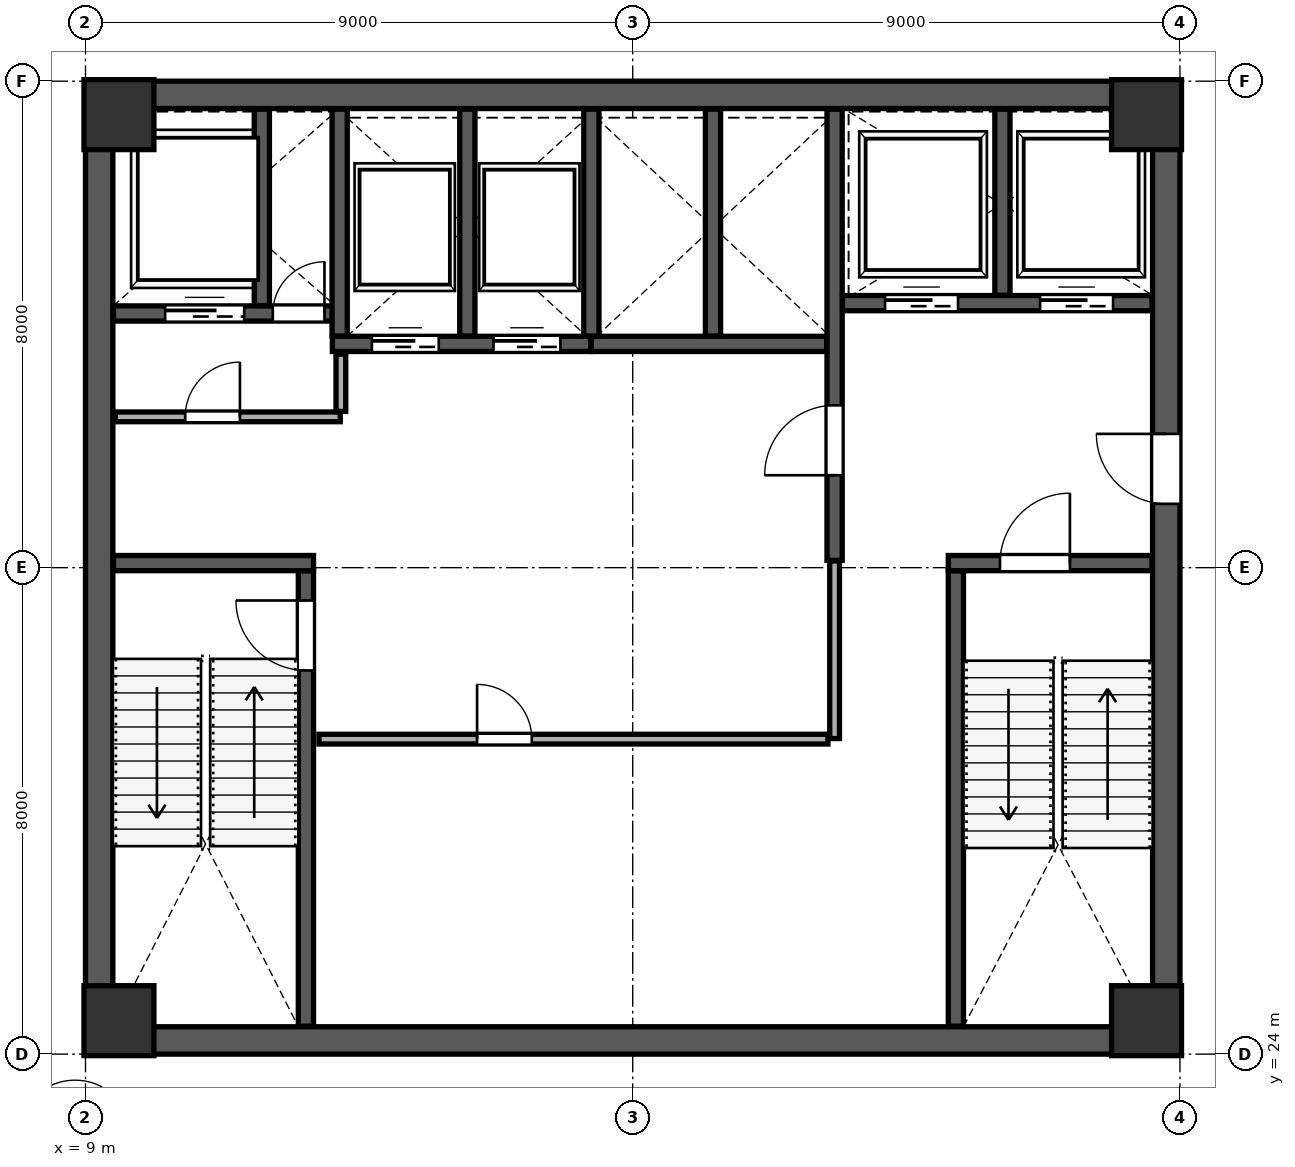
"""IFC4 building model, lengths in metres.
Left out: names, types, materials, properties, quantities, classifications, styles, units other than length and angle.
Written with IfcOpenShell. Run it as: python <this file> out.ifc"""

import sys

from ifc_helpers import new_model, si_unit, direction, frame, frame_2d, origin, origin_2d, place, context, subcontext, project, spatial, rectangle, extrude, source, transform, mapped, element, fill, save


model = new_model("IFC4")
c1 = context("Model", 3, precision=1e-05, world=origin(), true_north=direction((0.0, 1.0)))
c2 = subcontext(c1, "Body", "Model", "MODEL_VIEW")
j1 = project(units=[si_unit("LENGTHUNIT", "METRE"), si_unit("PLANEANGLEUNIT", "RADIAN")], contexts=[c1])
p1 = place(None, origin())
s1 = spatial("IfcSite", under=j1, at=p1, CompositionType="ELEMENT")
p2 = place(p1, origin())
s2 = spatial("IfcBuilding", under=s1, at=p2, CompositionType="ELEMENT")
p3 = place(p2, frame((0.0, 0.0, 175.0)))
s3 = spatial("IfcBuildingStorey", under=s2, at=p3, CompositionType="ELEMENT", Elevation=175.0)
m1 = source(origin(), c2, "Body", "SweptSolid", [
    extrude(rectangle(XDim=1.15, YDim=1.15, at=origin_2d()), origin(), (0.0, 0.0, 1.0), 4.198),
])
for number, where, z_axis, x_axis in (
    (1, (9.55, 24.55, 0.001), (0.0, 0.0, 1.0), (1.0, 0.0, 0.0)),
    (2, (26.45, 24.55, 0.001), (0.0, 0.0, 1.0), (1.0, 0.0, 0.0)),
    (3, (9.55, 39.45, 0.001), (0.0, 0.0, 1.0), (1.0, 0.0, 0.0)),
    (4, (26.45, 39.45, 0.001), (0.0, 0.0, 1.0), (1.0, 0.0, 0.0)),
):
    element("IfcColumn", number, at=place(p3, frame(where, z_axis=z_axis, x_axis=x_axis)), inside=s3, PredefinedType="COLUMN", context=c2, shape_type="MappedRepresentation", body=[
        mapped(m1, transform((0.0, 0.0, 0.0), scale=1.0)),
    ])
p4 = place(p3, frame((9.225, 24.45, 0.0), z_axis=(0.0, 0.0, 1.0), x_axis=(0.0, 1.0, 0.0)))
e5 = element("IfcWall", 5, at=p4, inside=s3, PredefinedType="SHEAR", context=c2, shape_type="SweptSolid", body=[
    extrude(rectangle(XDim=15.1, YDim=0.45, at=frame_2d((7.55, 0.0))), origin(), (0.0, 0.0, 1.0), 3.96),
])
p5 = place(p3, frame((26.775, 24.45, 0.0), z_axis=(0.0, 0.0, 1.0), x_axis=(0.0, 1.0, 0.0)))
e6 = element("IfcWall", 6, at=p5, inside=s3, PredefinedType="SHEAR", context=c2, shape_type="SweptSolid", body=[
    extrude(rectangle(XDim=15.1, YDim=0.45, at=frame_2d((7.55, 0.0))), origin(), (0.0, 0.0, 1.0), 3.96),
])
p6 = place(p5, frame((8.6, 0.0, 0.0)))
e7 = element("IfcOpeningElement", 7, at=p6, cuts=e6, PredefinedType="OPENING", context=c2, shape_type="SweptSolid", body=[
    extrude(rectangle(XDim=1.15, YDim=2.2, at=frame_2d((0.575, 1.1))), frame((0.0, 0.235, 0.0), z_axis=(0.0, -1.0, 0.0), x_axis=(1.0, 0.0, 0.0)), (0.0, 0.0, 1.0), 0.47),
])
for number, where, z_axis, x_axis in (
    (8, (9.0, 24.225, 0.0), (0.0, 0.0, 1.0), (1.0, 0.0, 0.0)),
    (9, (9.0, 39.775, 0.0), (0.0, 0.0, 1.0), (1.0, 0.0, 0.0)),
):
    element("IfcWall", number, at=place(p3, frame(where, z_axis=z_axis, x_axis=x_axis)), inside=s3, PredefinedType="SHEAR", context=c2, shape_type="SweptSolid", body=[
        extrude(rectangle(XDim=18.0, YDim=0.45, at=frame_2d((9.0, 0.0))), origin(), (0.0, 0.0, 1.0), 3.96),
    ])
p7 = place(p3, frame((12.625, 24.46, 0.0), z_axis=(0.0, 0.0, 1.0), x_axis=(0.0, 1.0, 0.0)))
e10 = element("IfcWall", 10, at=p7, inside=s3, PredefinedType="SHEAR", context=c2, shape_type="SweptSolid", body=[
    extrude(rectangle(XDim=7.49, YDim=0.25, at=frame_2d((3.745, 0.0))), origin(), (0.0, 0.0, 1.0), 3.96),
])
p8 = place(p7, frame((5.85, 0.0, 0.0)))
e11 = element("IfcOpeningElement", 11, at=p8, cuts=e10, PredefinedType="OPENING", context=c2, shape_type="SweptSolid", body=[
    extrude(rectangle(XDim=1.15, YDim=2.2, at=frame_2d((0.575, 1.1))), frame((0.0, 0.135, 0.0), z_axis=(0.0, -1.0, 0.0), x_axis=(1.0, 0.0, 0.0)), (0.0, 0.0, 1.0), 0.27),
])
p9 = place(p3, frame((9.46, 32.075, 0.0), z_axis=(0.0, 0.0, 1.0), x_axis=(1.0, 0.0, 0.0)))
e12 = element("IfcWall", 12, at=p9, inside=s3, PredefinedType="SHEAR", context=c2, shape_type="SweptSolid", body=[
    extrude(rectangle(XDim=3.29, YDim=0.25, at=frame_2d((1.645, 0.0))), origin(), (0.0, 0.0, 1.0), 3.96),
])
p10 = place(p3, frame((23.315, 24.46, 0.0), z_axis=(0.0, 0.0, 1.0), x_axis=(0.0, 1.0, 0.0)))
e13 = element("IfcWall", 13, at=p10, inside=s3, PredefinedType="SHEAR", context=c2, shape_type="SweptSolid", body=[
    extrude(rectangle(XDim=7.49, YDim=0.25, at=frame_2d((3.745, 0.0))), origin(), (0.0, 0.0, 1.0), 3.96),
])
p11 = place(p3, frame((23.19, 32.075, 0.0), z_axis=(0.0, 0.0, 1.0), x_axis=(1.0, 0.0, 0.0)))
e14 = element("IfcWall", 14, at=p11, inside=s3, PredefinedType="SHEAR", context=c2, shape_type="SweptSolid", body=[
    extrude(rectangle(XDim=3.35, YDim=0.25, at=frame_2d((1.675, 0.0))), origin(), (0.0, 0.0, 1.0), 3.96),
])
p12 = place(p11, frame((0.85, 0.0, 0.0)))
e15 = element("IfcOpeningElement", 15, at=p12, cuts=e14, PredefinedType="OPENING", context=c2, shape_type="SweptSolid", body=[
    extrude(rectangle(XDim=1.15, YDim=2.2, at=frame_2d((0.575, 1.1))), frame((0.0, 0.135, 0.0), z_axis=(0.0, -1.0, 0.0), x_axis=(1.0, 0.0, 0.0)), (0.0, 0.0, 1.0), 0.27),
])
p13 = place(p3, frame((21.32, 32.12, 0.0), z_axis=(0.0, 0.0, 1.0), x_axis=(0.0, 1.0, 0.0)))
e16 = element("IfcWall", 16, at=p13, inside=s3, PredefinedType="SHEAR", context=c2, shape_type="SweptSolid", body=[
    extrude(rectangle(XDim=7.42, YDim=0.25, at=frame_2d((3.71, 0.0))), origin(), (0.0, 0.0, 1.0), 3.96),
])
p14 = place(p13, frame((1.4, 0.0, 0.0)))
e17 = element("IfcOpeningElement", 17, at=p14, cuts=e16, PredefinedType="OPENING", context=c2, shape_type="SweptSolid", body=[
    extrude(rectangle(XDim=1.15, YDim=2.2, at=frame_2d((0.575, 1.1))), frame((0.0, 0.135, 0.0), z_axis=(0.0, -1.0, 0.0), x_axis=(1.0, 0.0, 0.0)), (0.0, 0.0, 1.0), 0.27),
])
p15 = place(p3, frame((9.46, 36.18, 0.0), z_axis=(0.0, 0.0, 1.0), x_axis=(1.0, 0.0, 0.0)))
e18 = element("IfcWall", 18, at=p15, inside=s3, PredefinedType="SHEAR", context=c2, shape_type="SweptSolid", body=[
    extrude(rectangle(XDim=3.79, YDim=0.25, at=frame_2d((1.895, 0.0))), origin(), (0.0, 0.0, 1.0), 3.96),
])
p16 = place(p15, frame((2.62, 0.0, 0.0)))
e19 = element("IfcOpeningElement", 19, at=p16, cuts=e18, PredefinedType="OPENING", context=c2, shape_type="SweptSolid", body=[
    extrude(rectangle(XDim=0.85, YDim=2.1, at=frame_2d((0.425, 1.05))), frame((0.0, 0.135, 0.0), z_axis=(0.0, -1.0, 0.0), x_axis=(1.0, 0.0, 0.0)), (0.0, 0.0, 1.0), 0.27),
])
p17 = place(p15, frame((0.85, 0.0, 0.0)))
e20 = element("IfcOpeningElement", 20, at=p17, cuts=e18, PredefinedType="OPENING", context=c2, shape_type="SweptSolid", body=[
    extrude(rectangle(XDim=1.3, YDim=2.25, at=frame_2d((0.65, 1.125))), frame((0.0, 0.135, 0.0), z_axis=(0.0, -1.0, 0.0), x_axis=(1.0, 0.0, 0.0)), (0.0, 0.0, 1.0), 0.27),
])
p18 = place(p3, frame((11.9, 36.31, 0.0), z_axis=(0.0, 0.0, 1.0), x_axis=(0.0, 1.0, 0.0)))
e21 = element("IfcWall", 21, at=p18, inside=s3, PredefinedType="SHEAR", context=c2, shape_type="SweptSolid", body=[
    extrude(rectangle(XDim=3.23, YDim=0.25, at=frame_2d((1.615, 0.0))), origin(), (0.0, 0.0, 1.0), 3.96),
])
p19 = place(p3, frame((21.45, 36.35, 0.0), z_axis=(0.0, 0.0, 1.0), x_axis=(1.0, 0.0, 0.0)))
e22 = element("IfcWall", 22, at=p19, inside=s3, PredefinedType="SHEAR", context=c2, shape_type="SweptSolid", body=[
    extrude(rectangle(XDim=5.09, YDim=0.25, at=frame_2d((2.545, 0.0))), origin(), (0.0, 0.0, 1.0), 3.96),
])
p20 = place(p19, frame((0.7, 0.0, 0.0)))
e23 = element("IfcOpeningElement", 23, at=p20, cuts=e22, PredefinedType="OPENING", context=c2, shape_type="SweptSolid", body=[
    extrude(rectangle(XDim=1.2, YDim=2.2, at=frame_2d((0.6, 1.1))), frame((0.0, 0.135, 0.0), z_axis=(0.0, -1.0, 0.0), x_axis=(1.0, 0.0, 0.0)), (0.0, 0.0, 1.0), 0.27),
])
p21 = place(p19, frame((3.25, 0.0, 0.0)))
e24 = element("IfcOpeningElement", 24, at=p21, cuts=e22, PredefinedType="OPENING", context=c2, shape_type="SweptSolid", body=[
    extrude(rectangle(XDim=1.2, YDim=2.2, at=frame_2d((0.6, 1.1))), frame((0.0, 0.135, 0.0), z_axis=(0.0, -1.0, 0.0), x_axis=(1.0, 0.0, 0.0)), (0.0, 0.0, 1.0), 0.27),
])
p22 = place(p3, frame((24.08, 36.48, 0.0), z_axis=(0.0, 0.0, 1.0), x_axis=(0.0, 1.0, 0.0)))
e25 = element("IfcWall", 25, at=p22, inside=s3, PredefinedType="SHEAR", context=c2, shape_type="SweptSolid", body=[
    extrude(rectangle(XDim=3.06, YDim=0.25, at=frame_2d((1.53, 0.0))), origin(), (0.0, 0.0, 1.0), 3.96),
])
p23 = place(p3, frame((13.06, 35.68, 0.0), z_axis=(0.0, 0.0, 1.0), x_axis=(1.0, 0.0, 0.0)))
e26 = element("IfcWall", 26, at=p23, inside=s3, PredefinedType="SHEAR", context=c2, shape_type="SweptSolid", body=[
    extrude(rectangle(XDim=4.25, YDim=0.25, at=frame_2d((2.125, 0.0))), origin(), (0.0, 0.0, 1.0), 3.96),
])
p24 = place(p23, frame((0.65, 0.0, 0.0)))
e27 = element("IfcOpeningElement", 27, at=p24, cuts=e26, PredefinedType="OPENING", context=c2, shape_type="SweptSolid", body=[
    extrude(rectangle(XDim=1.1, YDim=2.2, at=frame_2d((0.55, 1.1))), frame((0.0, 0.135, 0.0), z_axis=(0.0, -1.0, 0.0), x_axis=(1.0, 0.0, 0.0)), (0.0, 0.0, 1.0), 0.27),
])
p25 = place(p23, frame((2.65, 0.0, 0.0)))
e28 = element("IfcOpeningElement", 28, at=p25, cuts=e26, PredefinedType="OPENING", context=c2, shape_type="SweptSolid", body=[
    extrude(rectangle(XDim=1.1, YDim=2.2, at=frame_2d((0.55, 1.1))), frame((0.0, 0.135, 0.0), z_axis=(0.0, -1.0, 0.0), x_axis=(1.0, 0.0, 0.0)), (0.0, 0.0, 1.0), 0.27),
])
for number, where, z_axis, x_axis in (
    (29, (13.18, 35.81, 0.0), (0.0, 0.0, 1.0), (0.0, 1.0, 0.0)),
    (30, (15.28, 35.81, 0.0), (0.0, 0.0, 1.0), (0.0, 1.0, 0.0)),
):
    element("IfcWall", number, at=place(p3, frame(where, z_axis=z_axis, x_axis=x_axis)), inside=s3, PredefinedType="SHEAR", context=c2, shape_type="SweptSolid", body=[
        extrude(rectangle(XDim=3.73, YDim=0.25, at=frame_2d((1.865, 0.0))), origin(), (0.0, 0.0, 1.0), 3.96),
    ])
p26 = place(p3, frame((17.32, 35.68, 0.0), z_axis=(0.0, 0.0, 1.0), x_axis=(1.0, 0.0, 0.0)))
e31 = element("IfcWall", 31, at=p26, inside=s3, PredefinedType="SHEAR", context=c2, shape_type="SweptSolid", body=[
    extrude(rectangle(XDim=3.87, YDim=0.25, at=frame_2d((1.935, 0.0))), origin(), (0.0, 0.0, 1.0), 3.96),
])
for number, where, z_axis, x_axis in (
    (32, (17.32, 35.81, 0.0), (0.0, 0.0, 1.0), (0.0, 1.0, 0.0)),
    (33, (19.32, 35.81, 0.0), (0.0, 0.0, 1.0), (0.0, 1.0, 0.0)),
):
    element("IfcWall", number, at=place(p3, frame(where, z_axis=z_axis, x_axis=x_axis)), inside=s3, PredefinedType="SHEAR", context=c2, shape_type="SweptSolid", body=[
        extrude(rectangle(XDim=3.73, YDim=0.25, at=frame_2d((1.865, 0.0))), origin(), (0.0, 0.0, 1.0), 3.96),
    ])
p27 = place(p3, frame((9.49, 34.48, 0.0), z_axis=(0.0, 0.0, 1.0), x_axis=(1.0, 0.0, 0.0)))
e34 = element("IfcWall", 34, at=p27, inside=s3, PredefinedType="PARTITIONING", context=c2, shape_type="SweptSolid", body=[
    extrude(rectangle(XDim=3.7, YDim=0.16, at=frame_2d((1.85, 0.0))), origin(), (0.0, 0.0, 1.0), 3.96),
])
p28 = place(p27, frame((1.15, 0.0, 0.0)))
e35 = element("IfcOpeningElement", 35, at=p28, cuts=e34, PredefinedType="OPENING", context=c2, shape_type="SweptSolid", body=[
    extrude(rectangle(XDim=0.9, YDim=2.15, at=frame_2d((0.45, 1.075))), frame((0.0, 0.09, 0.0), z_axis=(0.0, -1.0, 0.0), x_axis=(1.0, 0.0, 0.0)), (0.0, 0.0, 1.0), 0.18),
])
p29 = place(p3, frame((13.2, 34.57, 0.0), z_axis=(0.0, 0.0, 1.0), x_axis=(0.0, 1.0, 0.0)))
e36 = element("IfcWall", 36, at=p29, inside=s3, PredefinedType="PARTITIONING", context=c2, shape_type="SweptSolid", body=[
    extrude(rectangle(XDim=0.94, YDim=0.16, at=frame_2d((0.47, 0.0))), origin(), (0.0, 0.0, 1.0), 3.96),
])
p30 = place(p3, frame((12.84, 29.18, 0.0), z_axis=(0.0, 0.0, 1.0), x_axis=(1.0, 0.0, 0.0)))
e37 = element("IfcWall", 37, at=p30, inside=s3, PredefinedType="PARTITIONING", context=c2, shape_type="SweptSolid", body=[
    extrude(rectangle(XDim=8.37, YDim=0.16, at=frame_2d((4.185, 0.0))), origin(), (0.0, 0.0, 1.0), 3.96),
])
p31 = place(p30, frame((2.6, 0.0, 0.0)))
e38 = element("IfcOpeningElement", 38, at=p31, cuts=e37, PredefinedType="OPENING", context=c2, shape_type="SweptSolid", body=[
    extrude(rectangle(XDim=0.9, YDim=2.15, at=frame_2d((0.45, 1.075))), frame((0.0, 0.09, 0.0), z_axis=(0.0, -1.0, 0.0), x_axis=(1.0, 0.0, 0.0)), (0.0, 0.0, 1.0), 0.18),
])
p32 = place(p3, frame((21.32, 29.19, 0.0), z_axis=(0.0, 0.0, 1.0), x_axis=(0.0, 1.0, 0.0)))
e39 = element("IfcWall", 39, at=p32, inside=s3, PredefinedType="PARTITIONING", context=c2, shape_type="SweptSolid", body=[
    extrude(rectangle(XDim=2.92, YDim=0.16, at=frame_2d((1.46, 0.0))), origin(), (0.0, 0.0, 1.0), 3.96),
])
p33 = place(p3, frame((6.699, 23.73, 0.0), z_axis=(0.0, 0.0, 1.0), x_axis=(0.887009683963, -0.46175082085, 0.0)))
e40 = element("IfcWall", 40, at=p33, inside=s3, PredefinedType="PARTITIONING", context=c2, shape_type="SweptSolid", body=[
    extrude(rectangle(XDim=19.81, YDim=0.16, at=frame_2d((9.905, 0.0))), origin(), (0.0, 0.0, 1.0), 3.96),
])
p34 = place(p33, frame((1.45, 0.0, 0.0)))
e41 = element("IfcOpeningElement", 41, at=p34, cuts=e40, PredefinedType="OPENING", context=c2, shape_type="SweptSolid", body=[
    extrude(rectangle(XDim=0.95, YDim=2.15, at=frame_2d((0.475, 1.075))), frame((0.0, 0.09, 0.0), z_axis=(0.0, -1.0, 0.0), x_axis=(1.0, 0.0, 0.0)), (0.0, 0.0, 1.0), 0.18),
])
p35 = place(p3, frame((11.104, 49.971, 0.0), z_axis=(0.0, 0.0, 1.0), x_axis=(0.887010001249, -0.461750211353, 0.0)))
e42 = element("IfcWall", 42, at=p35, inside=s3, PredefinedType="PARTITIONING", context=c2, shape_type="SweptSolid", body=[
    extrude(rectangle(XDim=28.02, YDim=0.135, at=frame_2d((14.01, 0.0))), origin(), (0.0, 0.0, 1.0), 3.96),
])
p36 = place(p35, frame((20.31, 0.0, 0.0)))
e43 = element("IfcOpeningElement", 43, at=p36, cuts=e42, PredefinedType="OPENING", context=c2, shape_type="SweptSolid", body=[
    extrude(rectangle(XDim=0.95, YDim=2.15, at=frame_2d((0.475, 1.075))), frame((0.0, 0.078, 0.0), z_axis=(0.0, -1.0, 0.0), x_axis=(1.0, 0.0, 0.0)), (0.0, 0.0, 1.0), 0.155),
])
m2 = source(origin(), c2, "Body", "SweptSolid", [
    extrude(rectangle(XDim=1.15, YDim=2.2, at=frame_2d((0.575, 1.1))), frame((0.0, 0.025, 0.0), z_axis=(0.0, -1.0, 0.0), x_axis=(1.0, 0.0, 0.0)), (0.0, 0.0, 1.0), 0.05),
])
p37 = place(p8, origin())
e44 = element("IfcDoor", 44, at=p37, inside=s3, OperationType="SINGLE_SWING_RIGHT", PredefinedType="DOOR", context=c2, shape_type="MappedRepresentation", body=[
    mapped(m2, transform((0.0, 0.0, 0.0), scale=1.0)),
])
fill(e11, e44)
m3 = source(origin(), c2, "Body", "SweptSolid", [
    extrude(rectangle(XDim=1.15, YDim=2.2, at=frame_2d((0.575, 1.1))), frame((0.0, 0.025, 0.0), z_axis=(0.0, -1.0, 0.0), x_axis=(1.0, 0.0, 0.0)), (0.0, 0.0, 1.0), 0.05),
])
p38 = place(p14, origin())
e45 = element("IfcDoor", 45, at=p38, inside=s3, OperationType="SINGLE_SWING_LEFT", PredefinedType="DOOR", context=c2, shape_type="MappedRepresentation", body=[
    mapped(m3, transform((0.0, 0.0, 0.0), scale=1.0)),
])
fill(e17, e45)
p39 = place(p12, origin())
e46 = element("IfcDoor", 46, at=p39, inside=s3, OperationType="SINGLE_SWING_RIGHT", PredefinedType="DOOR", context=c2, shape_type="MappedRepresentation", body=[
    mapped(m2, transform((0.0, 0.0, 0.0), scale=1.0)),
])
fill(e15, e46)
p40 = place(p6, origin())
e47 = element("IfcDoor", 47, at=p40, inside=s3, OperationType="SINGLE_SWING_RIGHT", PredefinedType="DOOR", context=c2, shape_type="MappedRepresentation", body=[
    mapped(m3, transform((0.0, 0.0, 0.0), scale=1.0)),
])
fill(e7, e47)
m4 = source(origin(), c2, "Body", "SweptSolid", [
    extrude(rectangle(XDim=0.85, YDim=2.1, at=frame_2d((0.425, 1.05))), frame((0.0, 0.025, 0.0), z_axis=(0.0, -1.0, 0.0), x_axis=(1.0, 0.0, 0.0)), (0.0, 0.0, 1.0), 0.05),
])
p41 = place(p16, origin())
e48 = element("IfcDoor", 48, at=p41, inside=s3, OperationType="SINGLE_SWING_RIGHT", PredefinedType="DOOR", context=c2, shape_type="MappedRepresentation", body=[
    mapped(m4, transform((0.0, 0.0, 0.0), scale=1.0)),
])
fill(e19, e48)
m5 = source(origin(), c2, "Body", "SweptSolid", [
    extrude(rectangle(XDim=1.1, YDim=2.2, at=frame_2d((0.55, 1.1))), frame((0.0, 0.025, 0.0), z_axis=(0.0, -1.0, 0.0), x_axis=(1.0, 0.0, 0.0)), (0.0, 0.0, 1.0), 0.05),
])
p42 = place(p24, origin())
e49 = element("IfcDoor", 49, at=p42, inside=s3, OperationType="SLIDING_TO_LEFT", PredefinedType="DOOR", context=c2, shape_type="MappedRepresentation", body=[
    mapped(m5, transform((0.0, 0.0, 0.0), scale=1.0)),
])
fill(e27, e49)
p43 = place(p25, origin())
e50 = element("IfcDoor", 50, at=p43, inside=s3, OperationType="SLIDING_TO_RIGHT", PredefinedType="DOOR", context=c2, shape_type="MappedRepresentation", body=[
    mapped(m5, transform((0.0, 0.0, 0.0), scale=1.0)),
])
fill(e28, e50)
m6 = source(origin(), c2, "Body", "SweptSolid", [
    extrude(rectangle(XDim=1.2, YDim=2.2, at=frame_2d((0.6, 1.1))), frame((0.0, 0.025, 0.0), z_axis=(0.0, -1.0, 0.0), x_axis=(1.0, 0.0, 0.0)), (0.0, 0.0, 1.0), 0.05),
])
p44 = place(p20, origin())
e51 = element("IfcDoor", 51, at=p44, inside=s3, OperationType="SLIDING_TO_LEFT", PredefinedType="DOOR", context=c2, shape_type="MappedRepresentation", body=[
    mapped(m6, transform((0.0, 0.0, 0.0), scale=1.0)),
])
fill(e23, e51)
p45 = place(p21, origin())
e52 = element("IfcDoor", 52, at=p45, inside=s3, OperationType="SLIDING_TO_RIGHT", PredefinedType="DOOR", context=c2, shape_type="MappedRepresentation", body=[
    mapped(m6, transform((0.0, 0.0, 0.0), scale=1.0)),
])
fill(e24, e52)
m7 = source(origin(), c2, "Body", "SweptSolid", [
    extrude(rectangle(XDim=1.3, YDim=2.25, at=frame_2d((0.65, 1.125))), frame((0.0, 0.025, 0.0), z_axis=(0.0, -1.0, 0.0), x_axis=(1.0, 0.0, 0.0)), (0.0, 0.0, 1.0), 0.05),
])
p46 = place(p17, origin())
e53 = element("IfcDoor", 53, at=p46, inside=s3, OperationType="SLIDING_TO_LEFT", PredefinedType="DOOR", context=c2, shape_type="MappedRepresentation", body=[
    mapped(m7, transform((0.0, 0.0, 0.0), scale=1.0)),
])
fill(e20, e53)
m8 = source(origin(), c2, "Body", "SweptSolid", [
    extrude(rectangle(XDim=0.9, YDim=2.15, at=frame_2d((0.45, 1.075))), frame((0.0, 0.025, 0.0), z_axis=(0.0, -1.0, 0.0), x_axis=(1.0, 0.0, 0.0)), (0.0, 0.0, 1.0), 0.05),
])
p47 = place(p28, origin())
e54 = element("IfcDoor", 54, at=p47, inside=s3, OperationType="SINGLE_SWING_RIGHT", PredefinedType="DOOR", context=c2, shape_type="MappedRepresentation", body=[
    mapped(m8, transform((0.0, 0.0, 0.0), scale=1.0)),
])
fill(e35, e54)
p48 = place(p31, origin())
e55 = element("IfcDoor", 55, at=p48, inside=s3, OperationType="SINGLE_SWING_LEFT", PredefinedType="DOOR", context=c2, shape_type="MappedRepresentation", body=[
    mapped(m8, transform((0.0, 0.0, 0.0), scale=1.0)),
])
fill(e38, e55)
save(model, sys.argv[1])
